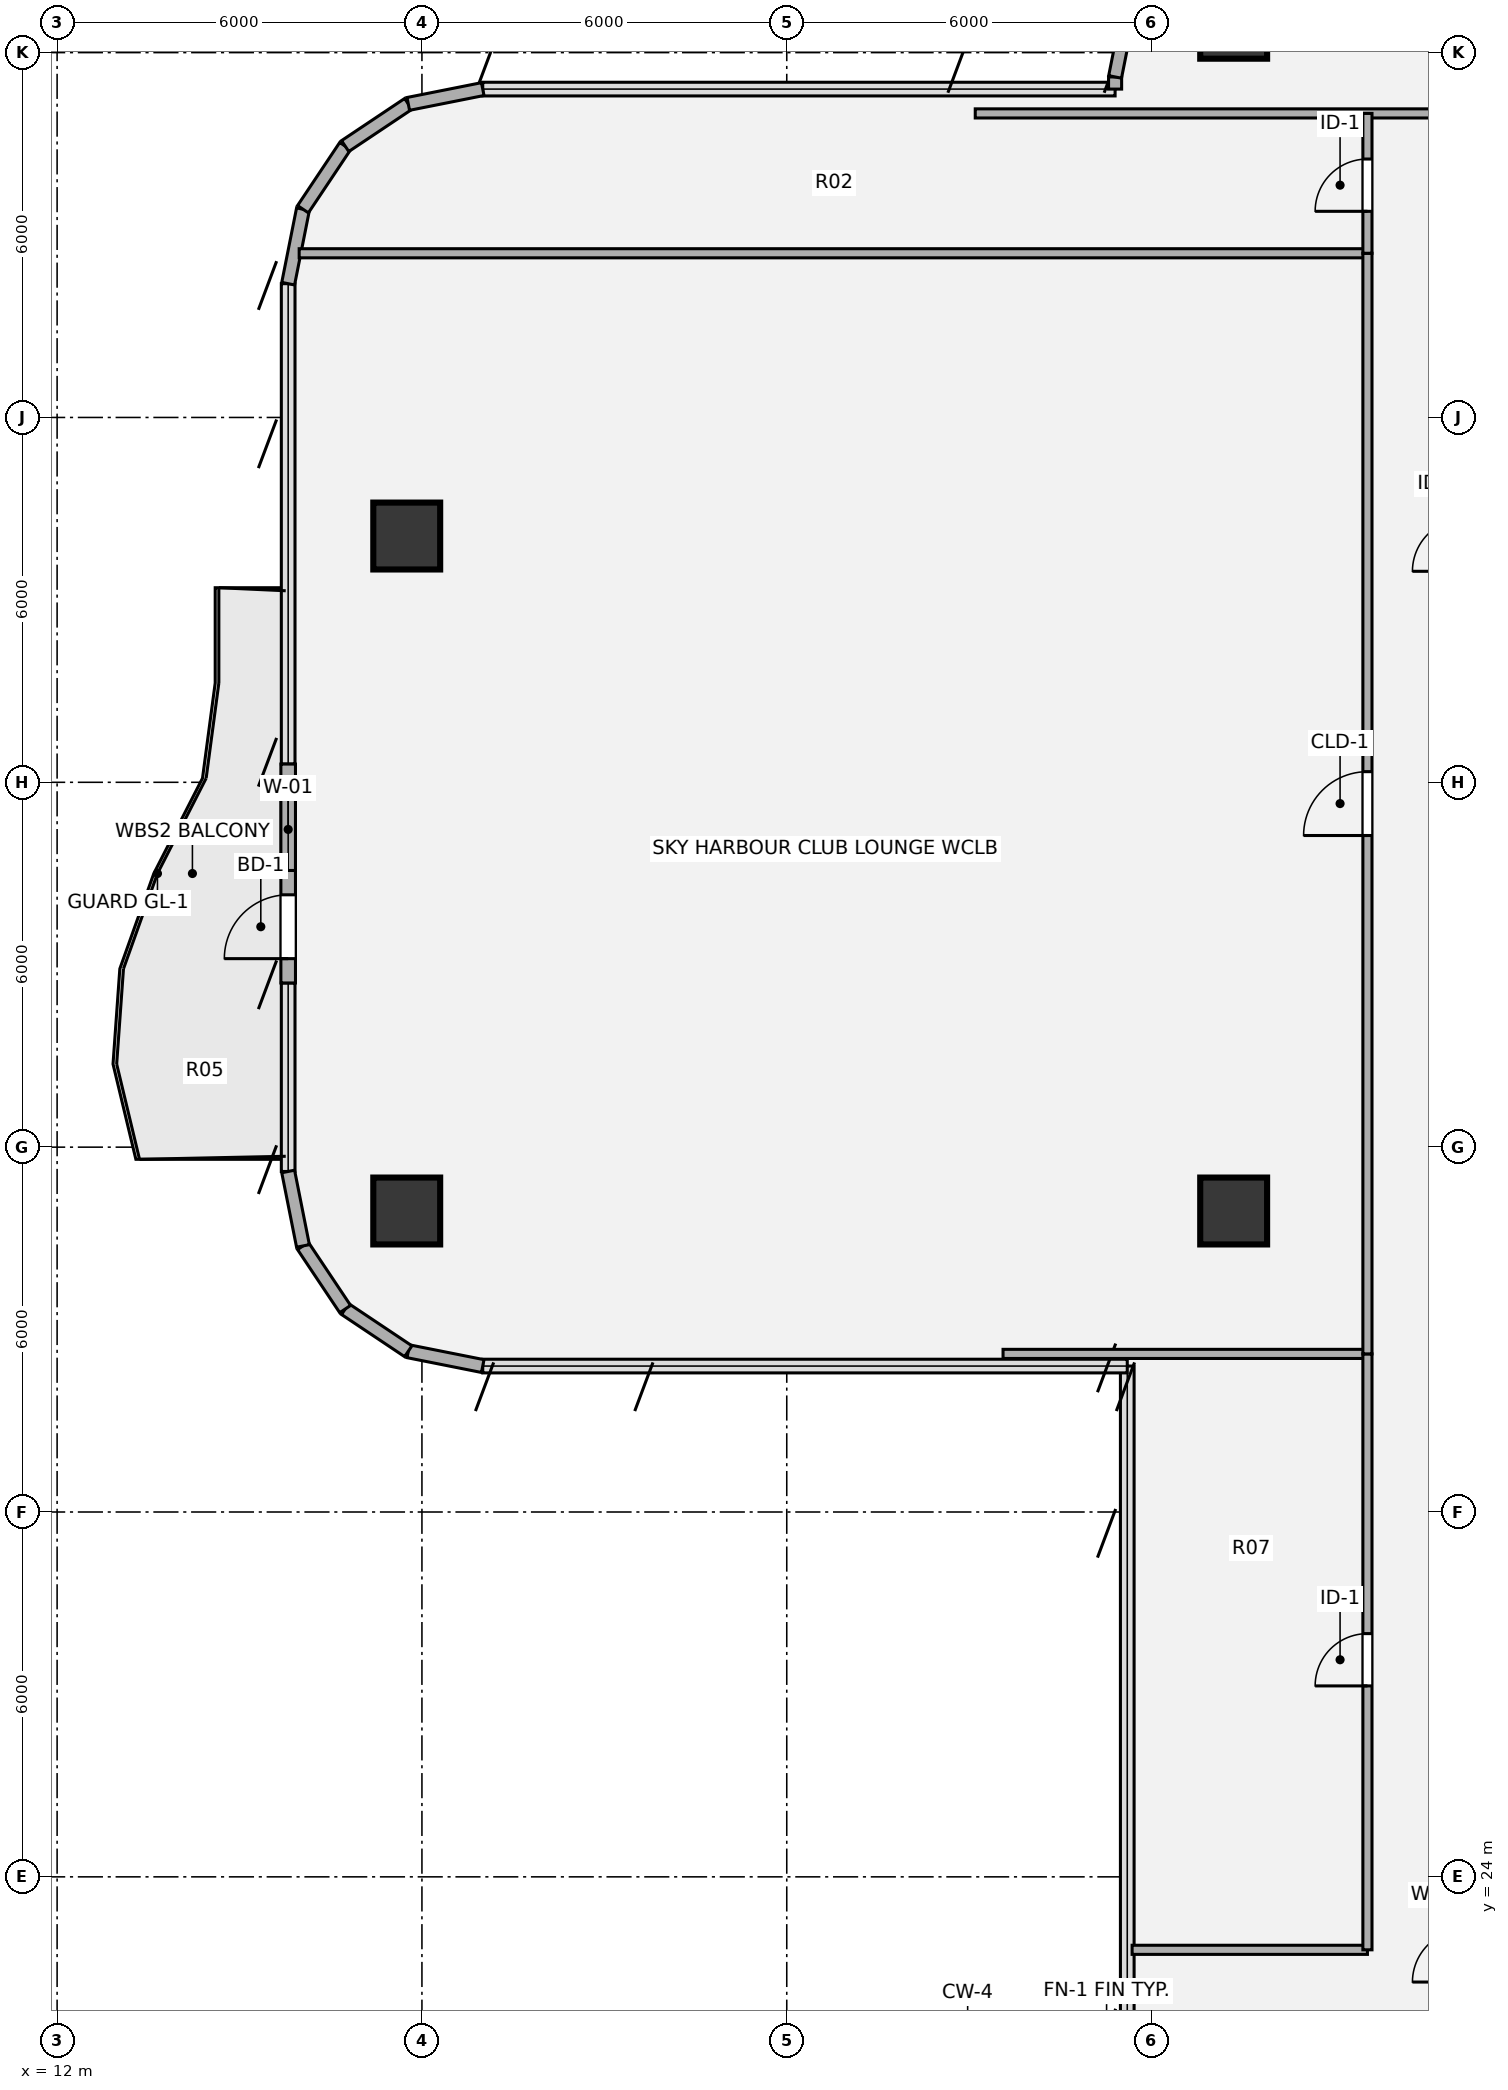
"""IFC4 building model, lengths in metres.
Left out: names, types, materials, properties, quantities, classifications, styles, units other than length and angle.
Written with IfcOpenShell. Run it as: python <this file> out.ifc"""

import sys

from ifc_helpers import new_model, si_unit, direction, frame, frame_2d, origin, origin_2d, place, context, subcontext, project, spatial, rectangle, hollow_circle, extrude, source, transform, mapped, element, fill, save


model = new_model("IFC4")
c1 = context("Model", 3, precision=1e-05, world=origin(), true_north=direction((0.0, 1.0)))
c2 = subcontext(c1, "Body", "Model", "MODEL_VIEW")
j1 = project(units=[si_unit("LENGTHUNIT", "METRE"), si_unit("PLANEANGLEUNIT", "RADIAN")], contexts=[c1])
p1 = place(None, origin())
s1 = spatial("IfcSite", under=j1, at=p1, CompositionType="ELEMENT")
p2 = place(p1, origin())
s2 = spatial("IfcBuilding", under=s1, at=p2, CompositionType="ELEMENT")
p3 = place(p2, frame((0.0, 0.0, 190.44)))
s3 = spatial("IfcBuildingStorey", under=s2, at=p3, CompositionType="ELEMENT", Elevation=190.44)
m1 = source(origin(), c2, "Body", "SweptSolid", [
    extrude(hollow_circle(Radius=0.55, WallThickness=0.04, at=origin_2d()), origin(), (0.0, 0.0, 1.0), 3.78),
])
for number, where, z_axis, x_axis in (
    (1, (17.75, 34.95, 0.0), (0.0, 0.0, 1.0), (1.0, 0.0, 0.0)),
    (2, (17.75, 46.05, 0.0), (0.0, 0.0, 1.0), (1.0, 0.0, 0.0)),
    (3, (31.35, 34.95, 0.0), (0.0, 0.0, 1.0), (1.0, 0.0, 0.0)),
    (4, (31.35, 54.45, 0.0), (0.0, 0.0, 1.0), (1.0, 0.0, 0.0)),
):
    element("IfcColumn", number, at=place(p3, frame(where, z_axis=z_axis, x_axis=x_axis)), inside=s3, PredefinedType="COLUMN", context=c2, shape_type="MappedRepresentation", body=[
        mapped(m1, transform((0.0, 0.0, 0.0), x_axis=(1.0, 0.0, 0.0), y_axis=(0.0, 1.0, 0.0), z_axis=(0.0, 0.0, 1.0), scale=1.0)),
    ])
for number, where, z_axis, x_axis in (
    (5, (19.0, 32.4, 0.0), (0.0, 0.0, 1.0), (-0.981, 0.195, 0.0)),
    (6, (17.775, 32.644, 0.0), (0.0, 0.0, 1.0), (-0.831, 0.556, 0.0)),
    (7, (16.737, 33.337, 0.0), (0.0, 0.0, 1.0), (-0.556, 0.831, 0.0)),
    (8, (16.044, 34.375, 0.0), (0.0, 0.0, 1.0), (-0.195, 0.981, 0.0)),
):
    element("IfcWall", number, at=place(p3, frame(where, z_axis=z_axis, x_axis=x_axis)), inside=s3, PredefinedType="SOLIDWALL", context=c2, shape_type="SweptSolid", body=[
        extrude(rectangle(XDim=1.249, YDim=0.215, at=frame_2d((0.624, 0.0))), origin(), (0.0, 0.0, 1.0), 3.53),
    ])
p4 = place(p3, frame((15.8, 38.7, 0.0), z_axis=(0.0, 0.0, 1.0), x_axis=(0.0, 1.0, 0.0)))
e9 = element("IfcWall", 9, at=p4, inside=s3, PredefinedType="SOLIDWALL", context=c2, shape_type="SweptSolid", body=[
    extrude(rectangle(XDim=3.6, YDim=0.24, at=frame_2d((1.8, 0.0))), origin(), (0.0, 0.0, 1.0), 3.53),
])
p5 = place(p4, frame((0.4, 0.0, 0.0)))
e10 = element("IfcOpeningElement", 10, at=p5, cuts=e9, PredefinedType="OPENING", context=c2, shape_type="SweptSolid", body=[
    extrude(rectangle(XDim=1.05, YDim=2.15, at=origin_2d()), frame((0.525, 0.13, 1.075), z_axis=(0.0, -1.0, 0.0), x_axis=(1.0, 0.0, 0.0)), (0.0, 0.0, 1.0), 0.26),
])
p6 = place(p4, frame((1.85, 0.0, 0.85)))
e11 = element("IfcOpeningElement", 11, at=p6, cuts=e9, PredefinedType="OPENING", context=c2, shape_type="SweptSolid", body=[
    extrude(rectangle(XDim=1.35, YDim=1.35, at=origin_2d()), frame((0.675, 0.13, 0.675), z_axis=(0.0, -1.0, 0.0), x_axis=(1.0, 0.0, 0.0)), (0.0, 0.0, 1.0), 0.26),
])
for number, where, z_axis, x_axis in (
    (12, (15.8, 50.2, 0.0), (0.0, 0.0, 1.0), (0.195, 0.981, 0.0)),
    (13, (16.044, 51.425, 0.0), (0.0, 0.0, 1.0), (0.556, 0.831, 0.0)),
    (14, (16.737, 52.463, 0.0), (0.0, 0.0, 1.0), (0.831, 0.556, 0.0)),
    (15, (17.775, 53.156, 0.0), (0.0, 0.0, 1.0), (0.981, 0.195, 0.0)),
):
    element("IfcWall", number, at=place(p3, frame(where, z_axis=z_axis, x_axis=x_axis)), inside=s3, PredefinedType="SOLIDWALL", context=c2, shape_type="SweptSolid", body=[
        extrude(rectangle(XDim=1.249, YDim=0.215, at=frame_2d((0.624, 0.0))), origin(), (0.0, 0.0, 1.0), 3.53),
    ])
p7 = place(p3, frame((29.4, 53.4, 0.0), z_axis=(0.0, 0.0, 1.0), x_axis=(0.0, 1.0, 0.0)))
e16 = element("IfcWall", 16, at=p7, inside=s3, PredefinedType="SOLIDWALL", context=c2, shape_type="SweptSolid", body=[
    extrude(rectangle(XDim=0.2, YDim=0.215, at=frame_2d((0.1, 0.0))), origin(), (0.0, 0.0, 1.0), 3.53),
])
p8 = place(p3, frame((29.4, 53.6, 0.0), z_axis=(0.0, 0.0, 1.0), x_axis=(0.195127417394, 0.980777900945, 0.0)))
e17 = element("IfcWall", 17, at=p8, inside=s3, PredefinedType="SOLIDWALL", context=c2, shape_type="SweptSolid", body=[
    extrude(rectangle(XDim=1.092, YDim=0.215, at=frame_2d((0.546, 0.0))), origin(), (0.0, 0.0, 1.0), 3.53),
])
p9 = place(p3, frame((29.68, 22.8, 0.0), z_axis=(0.0, 0.0, 1.0), x_axis=(1.0, 0.0, 0.0)))
e18 = element("IfcWall", 18, at=p9, inside=s3, PredefinedType="PARTITIONING", context=c2, shape_type="SweptSolid", body=[
    extrude(rectangle(XDim=3.87, YDim=0.15, at=frame_2d((1.935, 0.0))), origin(), (0.0, 0.0, 1.0), 3.5),
])
p10 = place(p3, frame((27.557, 32.6, 0.0), z_axis=(0.0, 0.0, 1.0), x_axis=(1.0, 0.0, 0.0)))
e19 = element("IfcWall", 19, at=p10, inside=s3, PredefinedType="PARTITIONING", context=c2, shape_type="SweptSolid", body=[
    extrude(rectangle(XDim=5.993, YDim=0.15, at=frame_2d((2.997, 0.0))), origin(), (0.0, 0.0, 1.0), 3.5),
])
p11 = place(p3, frame((15.981, 50.7, 0.0), z_axis=(0.0, 0.0, 1.0), x_axis=(1.0, 0.0, 0.0)))
e20 = element("IfcWall", 20, at=p11, inside=s3, PredefinedType="PARTITIONING", context=c2, shape_type="SweptSolid", body=[
    extrude(rectangle(XDim=17.569, YDim=0.15, at=frame_2d((8.785, 0.0))), origin(), (0.0, 0.0, 1.0), 3.308),
])
p12 = place(p3, frame((27.1, 53.0, 0.0), z_axis=(0.0, 0.0, 1.0), x_axis=(1.0, 0.0, 0.0)))
e21 = element("IfcWall", 21, at=p12, inside=s3, PredefinedType="PARTITIONING", context=c2, shape_type="SweptSolid", body=[
    extrude(rectangle(XDim=17.8, YDim=0.15, at=frame_2d((8.9, 0.0))), origin(), (0.0, 0.0, 1.0), 3.308),
])
p13 = place(p12, frame((8.375, 0.0, 0.0)))
e22 = element("IfcOpeningElement", 22, at=p13, cuts=e21, PredefinedType="OPENING", context=c2, shape_type="SweptSolid", body=[
    extrude(rectangle(XDim=1.05, YDim=2.1, at=origin_2d()), frame((0.525, 0.085, 1.05), z_axis=(0.0, -1.0, 0.0), x_axis=(1.0, 0.0, 0.0)), (0.0, 0.0, 1.0), 0.17),
])
p14 = place(p3, frame((33.55, 22.8, 0.0), z_axis=(0.0, 0.0, 1.0), x_axis=(0.0, 1.0, 0.0)))
e23 = element("IfcWall", 23, at=p14, inside=s3, PredefinedType="PARTITIONING", context=c2, shape_type="SweptSolid", body=[
    extrude(rectangle(XDim=9.8, YDim=0.15, at=frame_2d((4.9, 0.0))), origin(), (0.0, 0.0, 1.0), 3.5),
])
p15 = place(p14, frame((4.34, 0.0, 0.0)))
e24 = element("IfcOpeningElement", 24, at=p15, cuts=e23, PredefinedType="OPENING", context=c2, shape_type="SweptSolid", body=[
    extrude(rectangle(XDim=0.86, YDim=2.1, at=origin_2d()), frame((0.43, 0.085, 1.05), z_axis=(0.0, -1.0, 0.0), x_axis=(1.0, 0.0, 0.0)), (0.0, 0.0, 1.0), 0.17),
])
p16 = place(p3, frame((33.55, 32.6, 0.0), z_axis=(0.0, 0.0, 1.0), x_axis=(0.0, 1.0, 0.0)))
e25 = element("IfcWall", 25, at=p16, inside=s3, PredefinedType="PARTITIONING", context=c2, shape_type="SweptSolid", body=[
    extrude(rectangle(XDim=18.1, YDim=0.15, at=frame_2d((9.05, 0.0))), origin(), (0.0, 0.0, 1.0), 3.5),
])
p17 = place(p16, frame((8.525, 0.0, 0.0)))
e26 = element("IfcOpeningElement", 26, at=p17, cuts=e25, PredefinedType="OPENING", context=c2, shape_type="SweptSolid", body=[
    extrude(rectangle(XDim=1.05, YDim=2.1, at=origin_2d()), frame((0.525, 0.085, 1.05), z_axis=(0.0, -1.0, 0.0), x_axis=(1.0, 0.0, 0.0)), (0.0, 0.0, 1.0), 0.17),
])
p18 = place(p3, frame((33.55, 50.7, 0.0), z_axis=(0.0, 0.0, 1.0), x_axis=(0.0, 1.0, 0.0)))
e27 = element("IfcWall", 27, at=p18, inside=s3, PredefinedType="PARTITIONING", context=c2, shape_type="SweptSolid", body=[
    extrude(rectangle(XDim=2.3, YDim=0.15, at=frame_2d((1.15, 0.0))), origin(), (0.0, 0.0, 1.0), 3.5),
])
p19 = place(p18, frame((0.69, 0.0, 0.0)))
e28 = element("IfcOpeningElement", 28, at=p19, cuts=e27, PredefinedType="OPENING", context=c2, shape_type="SweptSolid", body=[
    extrude(rectangle(XDim=0.86, YDim=2.1, at=origin_2d()), frame((0.43, 0.085, 1.05), z_axis=(0.0, -1.0, 0.0), x_axis=(1.0, 0.0, 0.0)), (0.0, 0.0, 1.0), 0.17),
])
m2 = source(origin(), c2, "Body", "SweptSolid", [
    extrude(rectangle(XDim=1.05, YDim=2.15, at=origin_2d()), frame((0.525, 0.025, 1.075), z_axis=(0.0, -1.0, 0.0), x_axis=(1.0, 0.0, 0.0)), (0.0, 0.0, 1.0), 0.05),
])
p20 = place(p5, origin())
e29 = element("IfcDoor", 29, at=p20, inside=s3, OperationType="SINGLE_SWING_LEFT", PredefinedType="DOOR", context=c2, shape_type="MappedRepresentation", body=[
    mapped(m2, transform((0.0, 0.0, 0.0), x_axis=(1.0, 0.0, 0.0), y_axis=(0.0, 1.0, 0.0), z_axis=(0.0, 0.0, 1.0), scale=1.0)),
])
fill(e10, e29)
m3 = source(origin(), c2, "Body", "SweptSolid", [
    extrude(rectangle(XDim=1.35, YDim=1.35, at=origin_2d()), frame((0.675, 0.03, 0.675), z_axis=(0.0, -1.0, 0.0), x_axis=(1.0, 0.0, 0.0)), (0.0, 0.0, 1.0), 0.06),
])
p21 = place(p6, origin())
e30 = element("IfcWindow", 30, at=p21, inside=s3, PartitioningType="SINGLE_PANEL", PredefinedType="WINDOW", context=c2, shape_type="MappedRepresentation", body=[
    mapped(m3, transform((0.0, 0.0, 0.0), x_axis=(1.0, 0.0, 0.0), y_axis=(0.0, 1.0, 0.0), z_axis=(0.0, 0.0, 1.0), scale=1.0)),
])
fill(e11, e30)
m4 = source(origin(), c2, "Body", "SweptSolid", [
    extrude(rectangle(XDim=0.86, YDim=2.1, at=origin_2d()), frame((0.43, 0.025, 1.05), z_axis=(0.0, -1.0, 0.0), x_axis=(1.0, 0.0, 0.0)), (0.0, 0.0, 1.0), 0.05),
])
p22 = place(p15, origin())
e31 = element("IfcDoor", 31, at=p22, inside=s3, OperationType="SINGLE_SWING_LEFT", PredefinedType="DOOR", context=c2, shape_type="MappedRepresentation", body=[
    mapped(m4, transform((0.0, 0.0, 0.0), x_axis=(1.0, 0.0, 0.0), y_axis=(0.0, 1.0, 0.0), z_axis=(0.0, 0.0, 1.0), scale=1.0)),
])
fill(e24, e31)
m5 = source(origin(), c2, "Body", "SweptSolid", [
    extrude(rectangle(XDim=1.05, YDim=2.1, at=origin_2d()), frame((0.525, 0.025, 1.05), z_axis=(0.0, -1.0, 0.0), x_axis=(1.0, 0.0, 0.0)), (0.0, 0.0, 1.0), 0.05),
])
p23 = place(p17, origin())
e32 = element("IfcDoor", 32, at=p23, inside=s3, OperationType="SINGLE_SWING_LEFT", PredefinedType="DOOR", context=c2, shape_type="MappedRepresentation", body=[
    mapped(m5, transform((0.0, 0.0, 0.0), x_axis=(1.0, 0.0, 0.0), y_axis=(0.0, 1.0, 0.0), z_axis=(0.0, 0.0, 1.0), scale=1.0)),
])
fill(e26, e32)
p24 = place(p19, origin())
e33 = element("IfcDoor", 33, at=p24, inside=s3, OperationType="SINGLE_SWING_LEFT", PredefinedType="DOOR", context=c2, shape_type="MappedRepresentation", body=[
    mapped(m4, transform((0.0, 0.0, 0.0), x_axis=(1.0, 0.0, 0.0), y_axis=(0.0, 1.0, 0.0), z_axis=(0.0, 0.0, 1.0), scale=1.0)),
])
fill(e28, e33)
save(model, sys.argv[1])
